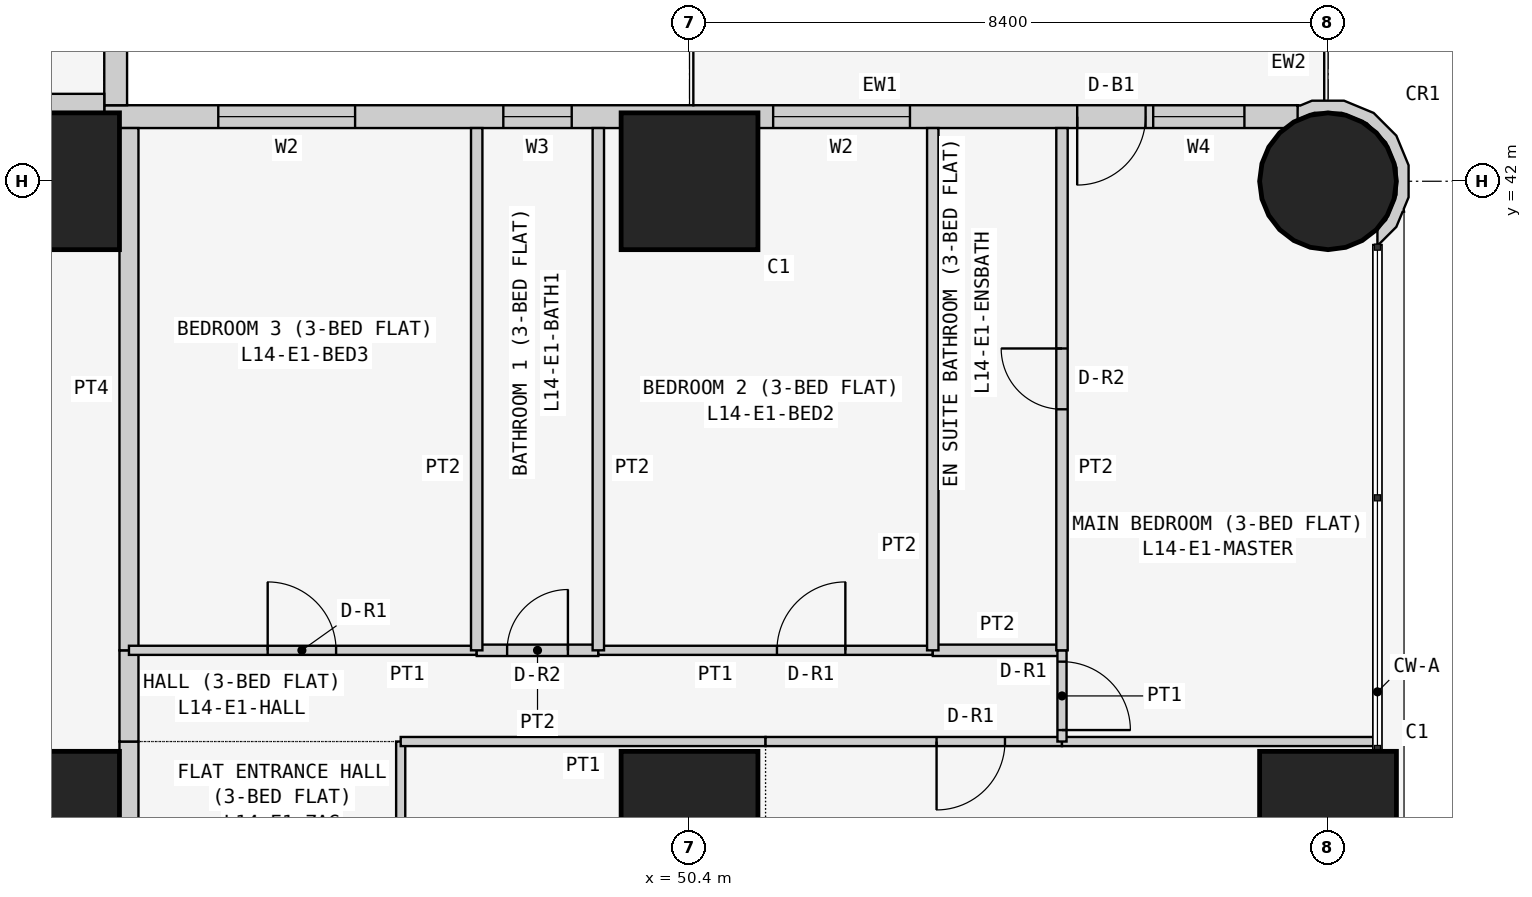
"""IFC4 building model, lengths in metres.
Left out: names, types, materials, properties, quantities, classifications, styles, units other than length and angle.
Written with IfcOpenShell. Run it as: python <this file> out.ifc"""

import sys

from ifc_helpers import new_model, si_unit, direction, frame, frame_2d, origin, origin_2d, place, context, subcontext, project, spatial, polyline, rectangle, circle, outline, extrude, element, fill, save


model = new_model("IFC4")
c1 = context("Model", 3, precision=1e-05, world=origin(), true_north=direction((0.0, 1.0)))
c2 = subcontext(c1, "Body", "Model", "MODEL_VIEW")
j1 = project(units=[si_unit("LENGTHUNIT", "METRE"), si_unit("PLANEANGLEUNIT", "RADIAN")], contexts=[c1])
p1 = place(None, origin())
s1 = spatial("IfcSite", under=j1, at=p1, CompositionType="ELEMENT")
p2 = place(p1, origin())
s2 = spatial("IfcBuilding", under=s1, at=p2, CompositionType="ELEMENT")
p3 = place(p2, frame((0.0, 0.0, 59.7)))
s3 = spatial("IfcBuildingStorey", under=s2, at=p3, CompositionType="ELEMENT", Elevation=59.7)
for number, where, z_axis, x_axis in (
    (1, (42.0, 33.6, 0.0), (0.0, 0.0, 1.0), (1.0, 0.0, 0.0)),
    (2, (42.0, 42.0, 0.0), (0.0, 0.0, 1.0), (1.0, 0.0, 0.0)),
    (3, (50.4, 33.6, 0.0), (0.0, 0.0, 1.0), (1.0, 0.0, 0.0)),
    (4, (50.4, 42.0, 0.0), (0.0, 0.0, 1.0), (1.0, 0.0, 0.0)),
    (5, (58.8, 33.6, 0.0), (0.0, 0.0, 1.0), (1.0, 0.0, 0.0)),
):
    element("IfcColumn", number, at=place(p3, frame(where, z_axis=z_axis, x_axis=x_axis)), inside=s3, PredefinedType="COLUMN", context=c2, shape_type="SweptSolid", body=[
        extrude(rectangle(XDim=1.8, YDim=1.8, at=origin_2d()), origin(), (0.0, 0.0, 1.0), 3.6),
    ])
p4 = place(p3, frame((58.8, 42.0, 0.0), z_axis=(0.0, 0.0, 1.0), x_axis=(1.0, 0.0, 0.0)))
e6 = element("IfcColumn", 6, at=p4, inside=s3, PredefinedType="COLUMN", context=c2, shape_type="SweptSolid", body=[
    extrude(circle(Radius=0.9, at=origin_2d()), origin(), (0.0, 0.0, 1.0), 3.6),
])
p5 = place(p3, frame((58.4, 42.85, 0.0), z_axis=(0.0, 0.0, 1.0), x_axis=(-1.0, 0.0, 0.0)))
e7 = element("IfcWall", 7, at=p5, inside=s3, PredefinedType="SOLIDWALL", context=c2, shape_type="SweptSolid", body=[
    extrude(rectangle(XDim=15.7, YDim=0.3, at=frame_2d((7.85, 0.0))), origin(), (0.0, 0.0, 1.0), 3.45),
])
p6 = place(p5, frame((12.4, 0.0, 0.9)))
e8 = element("IfcOpeningElement", 8, at=p6, cuts=e7, PredefinedType="OPENING", context=c2, shape_type="SweptSolid", body=[
    extrude(rectangle(XDim=1.8, YDim=1.5, at=frame_2d((0.9, 0.75))), frame((0.0, 0.16, 0.0), z_axis=(0.0, -1.0, 0.0), x_axis=(1.0, 0.0, 0.0)), (0.0, 0.0, 1.0), 0.32),
])
p7 = place(p5, frame((9.55, 0.0, 1.5)))
e9 = element("IfcOpeningElement", 9, at=p7, cuts=e7, PredefinedType="OPENING", context=c2, shape_type="SweptSolid", body=[
    extrude(rectangle(XDim=0.9, YDim=0.7, at=frame_2d((0.45, 0.35))), frame((0.0, 0.16, 0.0), z_axis=(0.0, -1.0, 0.0), x_axis=(1.0, 0.0, 0.0)), (0.0, 0.0, 1.0), 0.32),
])
p8 = place(p5, frame((5.1, 0.0, 0.9)))
e10 = element("IfcOpeningElement", 10, at=p8, cuts=e7, PredefinedType="OPENING", context=c2, shape_type="SweptSolid", body=[
    extrude(rectangle(XDim=1.8, YDim=1.5, at=frame_2d((0.9, 0.75))), frame((0.0, 0.16, 0.0), z_axis=(0.0, -1.0, 0.0), x_axis=(1.0, 0.0, 0.0)), (0.0, 0.0, 1.0), 0.32),
])
p9 = place(p5, frame((2.0, 0.0, 0.0)))
e11 = element("IfcOpeningElement", 11, at=p9, cuts=e7, PredefinedType="OPENING", context=c2, shape_type="SweptSolid", body=[
    extrude(rectangle(XDim=0.9, YDim=2.4, at=frame_2d((0.45, 1.2))), frame((0.0, 0.16, 0.0), z_axis=(0.0, -1.0, 0.0), x_axis=(1.0, 0.0, 0.0)), (0.0, 0.0, 1.0), 0.32),
])
p10 = place(p5, frame((0.7, 0.0, 0.9)))
e12 = element("IfcOpeningElement", 12, at=p10, cuts=e7, PredefinedType="OPENING", context=c2, shape_type="SweptSolid", body=[
    extrude(rectangle(XDim=1.2, YDim=1.5, at=frame_2d((0.6, 0.75))), frame((0.0, 0.16, 0.0), z_axis=(0.0, -1.0, 0.0), x_axis=(1.0, 0.0, 0.0)), (0.0, 0.0, 1.0), 0.32),
])
p11 = place(p3, frame((42.85, 43.0, 0.0), z_axis=(0.0, 0.0, 1.0), x_axis=(0.0, 1.0, 0.0)))
e13 = element("IfcWall", 13, at=p11, inside=s3, PredefinedType="SOLIDWALL", context=c2, shape_type="SweptSolid", body=[
    extrude(rectangle(XDim=15.4, YDim=0.3, at=frame_2d((7.7, 0.0))), origin(), (0.0, 0.0, 1.0), 3.45),
])
p12 = place(p11, frame((1.2, 0.0, 0.9)))
e14 = element("IfcOpeningElement", 14, at=p12, cuts=e13, PredefinedType="OPENING", context=c2, shape_type="SweptSolid", body=[
    extrude(rectangle(XDim=1.8, YDim=1.5, at=frame_2d((0.9, 0.75))), frame((0.0, 0.16, 0.0), z_axis=(0.0, -1.0, 0.0), x_axis=(1.0, 0.0, 0.0)), (0.0, 0.0, 1.0), 0.32),
])
p13 = place(p11, frame((4.95, 0.0, 1.5)))
e15 = element("IfcOpeningElement", 15, at=p13, cuts=e13, PredefinedType="OPENING", context=c2, shape_type="SweptSolid", body=[
    extrude(rectangle(XDim=0.9, YDim=0.7, at=frame_2d((0.45, 0.35))), frame((0.0, 0.16, 0.0), z_axis=(0.0, -1.0, 0.0), x_axis=(1.0, 0.0, 0.0)), (0.0, 0.0, 1.0), 0.32),
])
p14 = place(p11, frame((8.5, 0.0, 0.9)))
e16 = element("IfcOpeningElement", 16, at=p14, cuts=e13, PredefinedType="OPENING", context=c2, shape_type="SweptSolid", body=[
    extrude(rectangle(XDim=1.8, YDim=1.5, at=frame_2d((0.9, 0.75))), frame((0.0, 0.16, 0.0), z_axis=(0.0, -1.0, 0.0), x_axis=(1.0, 0.0, 0.0)), (0.0, 0.0, 1.0), 0.32),
])
p15 = place(p11, frame((12.5, 0.0, 0.0)))
e17 = element("IfcOpeningElement", 17, at=p15, cuts=e13, PredefinedType="OPENING", context=c2, shape_type="SweptSolid", body=[
    extrude(rectangle(XDim=0.9, YDim=2.4, at=frame_2d((0.45, 1.2))), frame((0.0, 0.16, 0.0), z_axis=(0.0, -1.0, 0.0), x_axis=(1.0, 0.0, 0.0)), (0.0, 0.0, 1.0), 0.32),
])
p16 = place(p11, frame((13.5, 0.0, 0.9)))
e18 = element("IfcOpeningElement", 18, at=p16, cuts=e13, PredefinedType="OPENING", context=c2, shape_type="SweptSolid", body=[
    extrude(rectangle(XDim=1.2, YDim=1.5, at=frame_2d((0.6, 0.75))), frame((0.0, 0.16, 0.0), z_axis=(0.0, -1.0, 0.0), x_axis=(1.0, 0.0, 0.0)), (0.0, 0.0, 1.0), 0.32),
])
p17 = place(p3, frame((59.411, 41.233, 0.0), z_axis=(0.0, 0.0, 1.0), x_axis=(0.926129809145, 0.377204953059, 0.0)))
e19 = element("IfcWall", 19, at=p17, inside=s3, PredefinedType="SOLIDWALL", context=c2, shape_type="SweptSolid", body=[
    extrude(outline(polyline([(0.626, 0.345), (0.785, 0.736), (0.782, 1.157), (0.619, 1.546), (0.319, 1.843), (-0.072, 2.002), (-0.24, 2.001), (-0.27, 2.017), (-0.37, 1.841), (-0.102, 1.842), (0.23, 1.707), (0.485, 1.455), (0.624, 1.125), (0.626, 0.766), (0.491, 0.434), (0.238, 0.179), (0.09, 0.117), (0.011, -0.078), (0.024, -0.083), (0.329, 0.045), (0.48, 0.198), (0.499, 0.193), (0.508, 0.225), (0.626, 0.345)])), origin(), (0.0, 0.0, 1.0), 3.45),
])
p18 = place(p3, frame((35.829, 43.025, 0.0), z_axis=(0.0, 0.0, 1.0), x_axis=(1.0, 0.0, 0.0)))
e20 = element("IfcWall", 20, at=p18, inside=s3, PredefinedType="PARTITIONING", context=c2, shape_type="SweptSolid", body=[
    extrude(rectangle(XDim=6.871, YDim=0.25, at=frame_2d((3.436, 0.0))), origin(), (0.0, 0.0, 1.0), 3.45),
])
p19 = place(p3, frame((43.025, 34.629, 0.0), z_axis=(0.0, 0.0, 1.0), x_axis=(0.0, -1.0, 0.0)))
e21 = element("IfcWall", 21, at=p19, inside=s3, PredefinedType="PARTITIONING", context=c2, shape_type="SweptSolid", body=[
    extrude(rectangle(XDim=5.229, YDim=0.25, at=frame_2d((2.615, 0.0))), origin(), (0.0, 0.0, 1.0), 3.45),
])
p20 = place(p19, frame((2.129, 0.0, 0.0)))
e22 = element("IfcOpeningElement", 22, at=p20, cuts=e21, PredefinedType="OPENING", context=c2, shape_type="SweptSolid", body=[
    extrude(rectangle(XDim=1.0, YDim=2.1, at=frame_2d((0.5, 1.05))), frame((0.0, 0.135, 0.0), z_axis=(0.0, -1.0, 0.0), x_axis=(1.0, 0.0, 0.0)), (0.0, 0.0, 1.0), 0.27),
])
p21 = place(p3, frame((43.025, 35.829, 0.0), z_axis=(0.0, 0.0, 1.0), x_axis=(0.0, -1.0, 0.0)))
e23 = element("IfcWall", 23, at=p21, inside=s3, PredefinedType="PARTITIONING", context=c2, shape_type="SweptSolid", body=[
    extrude(rectangle(XDim=1.2, YDim=0.25, at=frame_2d((0.6, 0.0))), origin(), (0.0, 0.0, 1.0), 3.45),
])
p22 = place(p3, frame((43.025, 42.7, 0.0), z_axis=(0.0, 0.0, 1.0), x_axis=(0.0, -1.0, 0.0)))
e24 = element("IfcWall", 24, at=p22, inside=s3, PredefinedType="PARTITIONING", context=c2, shape_type="SweptSolid", body=[
    extrude(rectangle(XDim=6.871, YDim=0.25, at=frame_2d((3.436, 0.0))), origin(), (0.0, 0.0, 1.0), 3.45),
])
p23 = place(p3, frame((46.6, 29.4, 0.0), z_axis=(0.0, 0.0, 1.0), x_axis=(0.0, 1.0, 0.0)))
e25 = element("IfcWall", 25, at=p23, inside=s3, PredefinedType="PARTITIONING", context=c2, shape_type="SweptSolid", body=[
    extrude(rectangle(XDim=5.229, YDim=0.12, at=frame_2d((2.615, 0.0))), origin(), (0.0, 0.0, 1.0), 3.45),
])
p24 = place(p23, frame((1.05, 0.0, 0.0)))
e26 = element("IfcOpeningElement", 26, at=p24, cuts=e25, PredefinedType="OPENING", context=c2, shape_type="SweptSolid", body=[
    extrude(rectangle(XDim=0.9, YDim=2.1, at=frame_2d((0.45, 1.05))), frame((0.0, 0.07, 0.0), z_axis=(0.0, -1.0, 0.0), x_axis=(1.0, 0.0, 0.0)), (0.0, 0.0, 1.0), 0.14),
])
p25 = place(p3, frame((51.4, 34.629, 0.0), z_axis=(0.0, 0.0, 1.0), x_axis=(-1.0, 0.0, 0.0)))
e27 = element("IfcWall", 27, at=p25, inside=s3, PredefinedType="PARTITIONING", context=c2, shape_type="SweptSolid", body=[
    extrude(rectangle(XDim=4.8, YDim=0.12, at=frame_2d((2.4, 0.0))), origin(), (0.0, 0.0, 1.0), 3.45),
])
p26 = place(p3, frame((55.3, 34.629, 0.0), z_axis=(0.0, 0.0, 1.0), x_axis=(-1.0, 0.0, 0.0)))
e28 = element("IfcWall", 28, at=p26, inside=s3, PredefinedType="PARTITIONING", context=c2, shape_type="SweptSolid", body=[
    extrude(rectangle(XDim=3.9, YDim=0.12, at=frame_2d((1.95, 0.0))), origin(), (0.0, 0.0, 1.0), 3.45),
])
p27 = place(p26, frame((0.75, 0.0, 0.0)))
e29 = element("IfcOpeningElement", 29, at=p27, cuts=e28, PredefinedType="OPENING", context=c2, shape_type="SweptSolid", body=[
    extrude(rectangle(XDim=0.9, YDim=2.1, at=frame_2d((0.45, 1.05))), frame((0.0, 0.07, 0.0), z_axis=(0.0, -1.0, 0.0), x_axis=(1.0, 0.0, 0.0)), (0.0, 0.0, 1.0), 0.14),
])
p28 = place(p3, frame((59.45, 34.629, 0.0), z_axis=(0.0, 0.0, 1.0), x_axis=(-1.0, 0.0, 0.0)))
e30 = element("IfcWall", 30, at=p28, inside=s3, PredefinedType="PARTITIONING", context=c2, shape_type="SweptSolid", body=[
    extrude(rectangle(XDim=4.15, YDim=0.12, at=frame_2d((2.075, 0.0))), origin(), (0.0, 0.0, 1.0), 3.45),
])
p29 = place(p3, frame((47.6, 35.829, 0.0), z_axis=(0.0, 0.0, 1.0), x_axis=(-1.0, 0.0, 0.0)))
e31 = element("IfcWall", 31, at=p29, inside=s3, PredefinedType="PARTITIONING", context=c2, shape_type="SweptSolid", body=[
    extrude(rectangle(XDim=4.575, YDim=0.12, at=frame_2d((2.288, 0.0))), origin(), (0.0, 0.0, 1.0), 3.45),
])
p30 = place(p29, frame((1.85, 0.0, 0.0)))
e32 = element("IfcOpeningElement", 32, at=p30, cuts=e31, PredefinedType="OPENING", context=c2, shape_type="SweptSolid", body=[
    extrude(rectangle(XDim=0.9, YDim=2.1, at=frame_2d((0.45, 1.05))), frame((0.0, 0.07, 0.0), z_axis=(0.0, -1.0, 0.0), x_axis=(1.0, 0.0, 0.0)), (0.0, 0.0, 1.0), 0.14),
])
p31 = place(p3, frame((49.2, 35.829, 0.0), z_axis=(0.0, 0.0, 1.0), x_axis=(-1.0, 0.0, 0.0)))
e33 = element("IfcWall", 33, at=p31, inside=s3, PredefinedType="PARTITIONING", context=c2, shape_type="SweptSolid", body=[
    extrude(rectangle(XDim=1.6, YDim=0.15, at=frame_2d((0.8, 0.0))), origin(), (0.0, 0.0, 1.0), 3.45),
])
p32 = place(p31, frame((0.4, 0.0, 0.0)))
e34 = element("IfcOpeningElement", 34, at=p32, cuts=e33, PredefinedType="OPENING", context=c2, shape_type="SweptSolid", body=[
    extrude(rectangle(XDim=0.8, YDim=2.1, at=frame_2d((0.4, 1.05))), frame((0.0, 0.085, 0.0), z_axis=(0.0, -1.0, 0.0), x_axis=(1.0, 0.0, 0.0)), (0.0, 0.0, 1.0), 0.17),
])
p33 = place(p3, frame((53.6, 35.829, 0.0), z_axis=(0.0, 0.0, 1.0), x_axis=(-1.0, 0.0, 0.0)))
e35 = element("IfcWall", 35, at=p33, inside=s3, PredefinedType="PARTITIONING", context=c2, shape_type="SweptSolid", body=[
    extrude(rectangle(XDim=4.4, YDim=0.12, at=frame_2d((2.2, 0.0))), origin(), (0.0, 0.0, 1.0), 3.45),
])
p34 = place(p33, frame((1.15, 0.0, 0.0)))
e36 = element("IfcOpeningElement", 36, at=p34, cuts=e35, PredefinedType="OPENING", context=c2, shape_type="SweptSolid", body=[
    extrude(rectangle(XDim=0.9, YDim=2.1, at=frame_2d((0.45, 1.05))), frame((0.0, 0.07, 0.0), z_axis=(0.0, -1.0, 0.0), x_axis=(1.0, 0.0, 0.0)), (0.0, 0.0, 1.0), 0.14),
])
p35 = place(p3, frame((55.3, 35.829, 0.0), z_axis=(0.0, 0.0, 1.0), x_axis=(-1.0, 0.0, 0.0)))
e37 = element("IfcWall", 37, at=p35, inside=s3, PredefinedType="PARTITIONING", context=c2, shape_type="SweptSolid", body=[
    extrude(rectangle(XDim=1.7, YDim=0.15, at=frame_2d((0.85, 0.0))), origin(), (0.0, 0.0, 1.0), 3.45),
])
p36 = place(p3, frame((55.3, 34.629, 0.0), z_axis=(0.0, 0.0, 1.0), x_axis=(0.0, 1.0, 0.0)))
e38 = element("IfcWall", 38, at=p36, inside=s3, PredefinedType="PARTITIONING", context=c2, shape_type="SweptSolid", body=[
    extrude(rectangle(XDim=1.2, YDim=0.12, at=frame_2d((0.6, 0.0))), origin(), (0.0, 0.0, 1.0), 3.45),
])
p37 = place(p36, frame((0.151, 0.0, 0.0)))
e39 = element("IfcOpeningElement", 39, at=p37, cuts=e38, PredefinedType="OPENING", context=c2, shape_type="SweptSolid", body=[
    extrude(rectangle(XDim=0.9, YDim=2.1, at=frame_2d((0.45, 1.05))), frame((0.0, 0.07, 0.0), z_axis=(0.0, -1.0, 0.0), x_axis=(1.0, 0.0, 0.0)), (0.0, 0.0, 1.0), 0.14),
])
for number, where, z_axis, x_axis in (
    (40, (47.6, 35.829, 0.0), (0.0, 0.0, 1.0), (0.0, 1.0, 0.0)),
    (41, (49.2, 35.829, 0.0), (0.0, 0.0, 1.0), (0.0, 1.0, 0.0)),
    (42, (53.6, 35.829, 0.0), (0.0, 0.0, 1.0), (0.0, 1.0, 0.0)),
):
    element("IfcWall", number, at=place(p3, frame(where, z_axis=z_axis, x_axis=x_axis)), inside=s3, PredefinedType="PARTITIONING", context=c2, shape_type="SweptSolid", body=[
        extrude(rectangle(XDim=6.871, YDim=0.15, at=frame_2d((3.436, 0.0))), origin(), (0.0, 0.0, 1.0), 3.45),
    ])
p38 = place(p3, frame((55.3, 35.829, 0.0), z_axis=(0.0, 0.0, 1.0), x_axis=(0.0, 1.0, 0.0)))
e43 = element("IfcWall", 43, at=p38, inside=s3, PredefinedType="PARTITIONING", context=c2, shape_type="SweptSolid", body=[
    extrude(rectangle(XDim=6.871, YDim=0.15, at=frame_2d((3.436, 0.0))), origin(), (0.0, 0.0, 1.0), 3.45),
])
p39 = place(p38, frame((3.171, 0.0, 0.0)))
e44 = element("IfcOpeningElement", 44, at=p39, cuts=e43, PredefinedType="OPENING", context=c2, shape_type="SweptSolid", body=[
    extrude(rectangle(XDim=0.8, YDim=2.1, at=frame_2d((0.4, 1.05))), frame((0.0, 0.085, 0.0), z_axis=(0.0, -1.0, 0.0), x_axis=(1.0, 0.0, 0.0)), (0.0, 0.0, 1.0), 0.17),
])
p40 = place(p6, origin())
e45 = element("IfcWindow", 45, at=p40, inside=s3, PartitioningType="SINGLE_PANEL", PredefinedType="WINDOW", context=c2, shape_type="SweptSolid", body=[
    extrude(rectangle(XDim=1.8, YDim=1.5, at=frame_2d((0.9, 0.75))), frame((0.0, 0.03, 0.0), z_axis=(0.0, -1.0, 0.0), x_axis=(1.0, 0.0, 0.0)), (0.0, 0.0, 1.0), 0.06),
])
fill(e8, e45)
p41 = place(p7, origin())
e46 = element("IfcWindow", 46, at=p41, inside=s3, PartitioningType="SINGLE_PANEL", PredefinedType="WINDOW", context=c2, shape_type="SweptSolid", body=[
    extrude(rectangle(XDim=0.9, YDim=0.7, at=frame_2d((0.45, 0.35))), frame((0.0, 0.03, 0.0), z_axis=(0.0, -1.0, 0.0), x_axis=(1.0, 0.0, 0.0)), (0.0, 0.0, 1.0), 0.06),
])
fill(e9, e46)
p42 = place(p8, origin())
e47 = element("IfcWindow", 47, at=p42, inside=s3, PartitioningType="SINGLE_PANEL", PredefinedType="WINDOW", context=c2, shape_type="SweptSolid", body=[
    extrude(rectangle(XDim=1.8, YDim=1.5, at=frame_2d((0.9, 0.75))), frame((0.0, 0.03, 0.0), z_axis=(0.0, -1.0, 0.0), x_axis=(1.0, 0.0, 0.0)), (0.0, 0.0, 1.0), 0.06),
])
fill(e10, e47)
p43 = place(p9, origin())
e48 = element("IfcDoor", 48, at=p43, inside=s3, OperationType="SINGLE_SWING_RIGHT", PredefinedType="DOOR", context=c2, shape_type="SweptSolid", body=[
    extrude(rectangle(XDim=0.9, YDim=2.4, at=frame_2d((0.45, 1.2))), frame((0.0, 0.025, 0.0), z_axis=(0.0, -1.0, 0.0), x_axis=(1.0, 0.0, 0.0)), (0.0, 0.0, 1.0), 0.05),
])
fill(e11, e48)
p44 = place(p10, origin())
e49 = element("IfcWindow", 49, at=p44, inside=s3, PartitioningType="SINGLE_PANEL", PredefinedType="WINDOW", context=c2, shape_type="SweptSolid", body=[
    extrude(rectangle(XDim=1.2, YDim=1.5, at=frame_2d((0.6, 0.75))), frame((0.0, 0.03, 0.0), z_axis=(0.0, -1.0, 0.0), x_axis=(1.0, 0.0, 0.0)), (0.0, 0.0, 1.0), 0.06),
])
fill(e12, e49)
p45 = place(p27, origin())
e50 = element("IfcDoor", 50, at=p45, inside=s3, OperationType="SINGLE_SWING_RIGHT", PredefinedType="DOOR", context=c2, shape_type="SweptSolid", body=[
    extrude(rectangle(XDim=0.9, YDim=2.1, at=frame_2d((0.45, 1.05))), frame((0.0, 0.025, 0.0), z_axis=(0.0, -1.0, 0.0), x_axis=(1.0, 0.0, 0.0)), (0.0, 0.0, 1.0), 0.05),
])
fill(e29, e50)
p46 = place(p30, frame((0.9, 0.0, 0.0), z_axis=(0.0, 0.0, 1.0), x_axis=(-1.0, 0.0, 0.0)))
e51 = element("IfcDoor", 51, at=p46, inside=s3, OperationType="SINGLE_SWING_LEFT", PredefinedType="DOOR", context=c2, shape_type="SweptSolid", body=[
    extrude(rectangle(XDim=0.9, YDim=2.1, at=frame_2d((0.45, 1.05))), frame((0.0, 0.025, 0.0), z_axis=(0.0, -1.0, 0.0), x_axis=(1.0, 0.0, 0.0)), (0.0, 0.0, 1.0), 0.05),
])
fill(e32, e51)
p47 = place(p32, frame((0.8, 0.0, 0.0), z_axis=(0.0, 0.0, 1.0), x_axis=(-1.0, 0.0, 0.0)))
e52 = element("IfcDoor", 52, at=p47, inside=s3, OperationType="SINGLE_SWING_RIGHT", PredefinedType="DOOR", context=c2, shape_type="SweptSolid", body=[
    extrude(rectangle(XDim=0.8, YDim=2.1, at=frame_2d((0.4, 1.05))), frame((0.0, 0.025, 0.0), z_axis=(0.0, -1.0, 0.0), x_axis=(1.0, 0.0, 0.0)), (0.0, 0.0, 1.0), 0.05),
])
fill(e34, e52)
p48 = place(p34, frame((0.9, 0.0, 0.0), z_axis=(0.0, 0.0, 1.0), x_axis=(-1.0, 0.0, 0.0)))
e53 = element("IfcDoor", 53, at=p48, inside=s3, OperationType="SINGLE_SWING_RIGHT", PredefinedType="DOOR", context=c2, shape_type="SweptSolid", body=[
    extrude(rectangle(XDim=0.9, YDim=2.1, at=frame_2d((0.45, 1.05))), frame((0.0, 0.025, 0.0), z_axis=(0.0, -1.0, 0.0), x_axis=(1.0, 0.0, 0.0)), (0.0, 0.0, 1.0), 0.05),
])
fill(e36, e53)
p49 = place(p37, frame((0.9, 0.0, 0.0), z_axis=(0.0, 0.0, 1.0), x_axis=(-1.0, 0.0, 0.0)))
e54 = element("IfcDoor", 54, at=p49, inside=s3, OperationType="SINGLE_SWING_RIGHT", PredefinedType="DOOR", context=c2, shape_type="SweptSolid", body=[
    extrude(rectangle(XDim=0.9, YDim=2.1, at=frame_2d((0.45, 1.05))), frame((0.0, 0.025, 0.0), z_axis=(0.0, -1.0, 0.0), x_axis=(1.0, 0.0, 0.0)), (0.0, 0.0, 1.0), 0.05),
])
fill(e39, e54)
p50 = place(p39, origin())
e55 = element("IfcDoor", 55, at=p50, inside=s3, OperationType="SINGLE_SWING_RIGHT", PredefinedType="DOOR", context=c2, shape_type="SweptSolid", body=[
    extrude(rectangle(XDim=0.8, YDim=2.1, at=frame_2d((0.4, 1.05))), frame((0.0, 0.025, 0.0), z_axis=(0.0, -1.0, 0.0), x_axis=(1.0, 0.0, 0.0)), (0.0, 0.0, 1.0), 0.05),
])
fill(e44, e55)
save(model, sys.argv[1])
